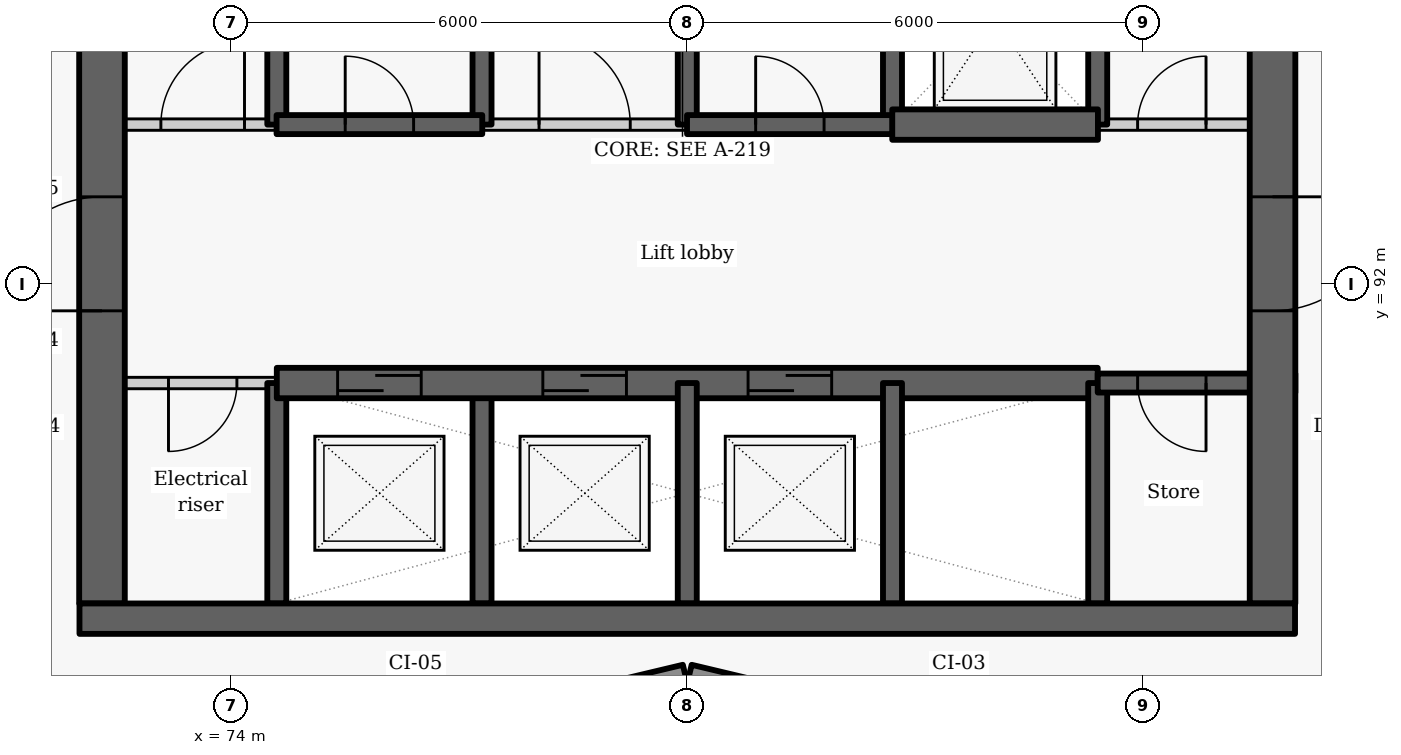
"""IFC4 building model, lengths in metres.
Left out: names, types, materials, properties, quantities, classifications, styles, units other than length and angle.
Written with IfcOpenShell. Run it as: python <this file> out.ifc"""

import sys

from ifc_helpers import new_model, si_unit, direction, frame, frame_2d, origin, place, context, subcontext, project, spatial, rectangle, extrude, element, fill, save


model = new_model("IFC4")
c1 = context("Model", 3, precision=1e-05, world=origin(), true_north=direction((0.0, 1.0)))
c2 = subcontext(c1, "Body", "Model", "MODEL_VIEW")
j1 = project(units=[si_unit("LENGTHUNIT", "METRE"), si_unit("PLANEANGLEUNIT", "RADIAN")], contexts=[c1])
p1 = place(None, origin())
s1 = spatial("IfcSite", under=j1, at=p1, CompositionType="ELEMENT")
p2 = place(p1, origin())
s2 = spatial("IfcBuilding", under=s1, at=p2, CompositionType="ELEMENT")
p3 = place(p2, frame((0.0, 0.0, 97.5)))
s3 = spatial("IfcBuildingStorey", under=s2, at=p3, CompositionType="ELEMENT", Elevation=97.5)
for number, where, z_axis, x_axis in (
    (1, (76.814, 86.119, 0.0), (0.0, 0.0, 1.0), (0.973, 0.232, 0.0)),
    (2, (80.029, 86.872, 0.0), (0.0, 0.0, 1.0), (0.973, -0.232, 0.0)),
):
    element("IfcWall", number, at=place(p3, frame(where, z_axis=z_axis, x_axis=x_axis)), inside=s3, PredefinedType="SOLIDWALL", context=c2, shape_type="SweptSolid", body=[
        extrude(rectangle(XDim=3.246, YDim=0.25, at=frame_2d((1.623, 0.0))), origin(), (0.0, 0.0, 1.0), 2.425),
    ])
p4 = place(p3, frame((74.6, 87.8, -0.275), z_axis=(0.0, 0.0, 1.0), x_axis=(0.0, 1.0, 0.0)))
e3 = element("IfcWall", 3, at=p4, inside=s3, PredefinedType="SHEAR", context=c2, shape_type="SweptSolid", body=[
    extrude(rectangle(XDim=2.9, YDim=0.25, at=frame_2d((1.45, 0.0))), origin(), (0.0, 0.0, 1.0), 3.3),
])
p5 = place(p3, frame((74.6, 94.1, -0.275), z_axis=(0.0, 0.0, 1.0), x_axis=(0.0, 1.0, 0.0)))
e4 = element("IfcWall", 4, at=p5, inside=s3, PredefinedType="SHEAR", context=c2, shape_type="SweptSolid", body=[
    extrude(rectangle(XDim=2.8, YDim=0.25, at=frame_2d((1.4, 0.0))), origin(), (0.0, 0.0, 1.0), 3.3),
])
p6 = place(p3, frame((74.6, 90.7, 0.0), z_axis=(0.0, 0.0, 1.0), x_axis=(-1.0, 0.0, 0.0)))
e5 = element("IfcWall", 5, at=p6, inside=s3, PredefinedType="PARTITIONING", context=c2, shape_type="SweptSolid", body=[
    extrude(rectangle(XDim=2.6, YDim=0.15, at=frame_2d((1.3, 0.0))), origin(), (0.0, 0.0, 1.0), 3.025),
])
p7 = place(p6, frame((0.525, 0.0, 0.0)))
e6 = element("IfcOpeningElement", 6, at=p7, cuts=e5, PredefinedType="OPENING", context=c2, shape_type="SweptSolid", body=[
    extrude(rectangle(XDim=0.9, YDim=2.1, at=frame_2d((0.45, 1.05))), frame((0.0, 0.085, 0.0), z_axis=(0.0, -1.0, 0.0), x_axis=(1.0, 0.0, 0.0)), (0.0, 0.0, 1.0), 0.17),
])
p8 = place(p3, frame((72.3, 87.8, -0.275), z_axis=(0.0, 0.0, 1.0), x_axis=(0.0, 1.0, 0.0)))
e7 = element("IfcWall", 7, at=p8, inside=s3, PredefinedType="SHEAR", context=c2, shape_type="SweptSolid", body=[
    extrude(rectangle(XDim=9.1, YDim=0.6, at=frame_2d((4.55, 0.0))), origin(), (0.0, 0.0, 1.0), 3.3),
])
p9 = place(p8, frame((3.85, 0.0, 0.275)))
e8 = element("IfcOpeningElement", 8, at=p9, cuts=e7, PredefinedType="OPENING", context=c2, shape_type="SweptSolid", body=[
    extrude(rectangle(XDim=1.5, YDim=2.1, at=frame_2d((0.75, 1.05))), frame((0.0, 0.31, 0.0), z_axis=(0.0, -1.0, 0.0), x_axis=(1.0, 0.0, 0.0)), (0.0, 0.0, 1.0), 0.62),
])
p10 = place(p3, frame((77.3, 87.8, -0.275), z_axis=(0.0, 0.0, 1.0), x_axis=(0.0, 1.0, 0.0)))
e9 = element("IfcWall", 9, at=p10, inside=s3, PredefinedType="SHEAR", context=c2, shape_type="SweptSolid", body=[
    extrude(rectangle(XDim=2.9, YDim=0.25, at=frame_2d((1.45, 0.0))), origin(), (0.0, 0.0, 1.0), 3.3),
])
p11 = place(p3, frame((77.3, 94.1, -0.275), z_axis=(0.0, 0.0, 1.0), x_axis=(0.0, 1.0, 0.0)))
e10 = element("IfcWall", 10, at=p11, inside=s3, PredefinedType="SHEAR", context=c2, shape_type="SweptSolid", body=[
    extrude(rectangle(XDim=2.8, YDim=0.25, at=frame_2d((1.4, 0.0))), origin(), (0.0, 0.0, 1.0), 3.3),
])
p12 = place(p3, frame((74.6, 90.7, -0.275), z_axis=(0.0, 0.0, 1.0), x_axis=(1.0, 0.0, 0.0)))
e11 = element("IfcWall", 11, at=p12, inside=s3, PredefinedType="SHEAR", context=c2, shape_type="SweptSolid", body=[
    extrude(rectangle(XDim=10.8, YDim=0.4, at=frame_2d((5.4, 0.0))), origin(), (0.0, 0.0, 1.0), 3.3),
])
p13 = place(p12, frame((0.8, 0.0, 0.275)))
e12 = element("IfcOpeningElement", 12, at=p13, cuts=e11, PredefinedType="OPENING", context=c2, shape_type="SweptSolid", body=[
    extrude(rectangle(XDim=1.1, YDim=2.1, at=frame_2d((0.55, 1.05))), frame((0.0, 0.21, 0.0), z_axis=(0.0, -1.0, 0.0), x_axis=(1.0, 0.0, 0.0)), (0.0, 0.0, 1.0), 0.42),
])
p14 = place(p12, frame((3.5, 0.0, 0.275)))
e13 = element("IfcOpeningElement", 13, at=p14, cuts=e11, PredefinedType="OPENING", context=c2, shape_type="SweptSolid", body=[
    extrude(rectangle(XDim=1.1, YDim=2.1, at=frame_2d((0.55, 1.05))), frame((0.0, 0.21, 0.0), z_axis=(0.0, -1.0, 0.0), x_axis=(1.0, 0.0, 0.0)), (0.0, 0.0, 1.0), 0.42),
])
p15 = place(p12, frame((6.2, 0.0, 0.275)))
e14 = element("IfcOpeningElement", 14, at=p15, cuts=e11, PredefinedType="OPENING", context=c2, shape_type="SweptSolid", body=[
    extrude(rectangle(XDim=1.1, YDim=2.1, at=frame_2d((0.55, 1.05))), frame((0.0, 0.21, 0.0), z_axis=(0.0, -1.0, 0.0), x_axis=(1.0, 0.0, 0.0)), (0.0, 0.0, 1.0), 0.42),
])
p16 = place(p3, frame((80.0, 87.8, -0.275), z_axis=(0.0, 0.0, 1.0), x_axis=(0.0, 1.0, 0.0)))
e15 = element("IfcWall", 15, at=p16, inside=s3, PredefinedType="SHEAR", context=c2, shape_type="SweptSolid", body=[
    extrude(rectangle(XDim=2.9, YDim=0.25, at=frame_2d((1.45, 0.0))), origin(), (0.0, 0.0, 1.0), 3.3),
])
p17 = place(p3, frame((80.0, 94.1, -0.275), z_axis=(0.0, 0.0, 1.0), x_axis=(0.0, 1.0, 0.0)))
e16 = element("IfcWall", 16, at=p17, inside=s3, PredefinedType="SHEAR", context=c2, shape_type="SweptSolid", body=[
    extrude(rectangle(XDim=2.8, YDim=0.25, at=frame_2d((1.4, 0.0))), origin(), (0.0, 0.0, 1.0), 3.3),
])
p18 = place(p3, frame((82.7, 87.8, -0.275), z_axis=(0.0, 0.0, 1.0), x_axis=(0.0, 1.0, 0.0)))
e17 = element("IfcWall", 17, at=p18, inside=s3, PredefinedType="SHEAR", context=c2, shape_type="SweptSolid", body=[
    extrude(rectangle(XDim=2.9, YDim=0.25, at=frame_2d((1.45, 0.0))), origin(), (0.0, 0.0, 1.0), 3.3),
])
p19 = place(p3, frame((82.7, 94.1, -0.275), z_axis=(0.0, 0.0, 1.0), x_axis=(0.0, 1.0, 0.0)))
e18 = element("IfcWall", 18, at=p19, inside=s3, PredefinedType="SHEAR", context=c2, shape_type="SweptSolid", body=[
    extrude(rectangle(XDim=2.8, YDim=0.25, at=frame_2d((1.4, 0.0))), origin(), (0.0, 0.0, 1.0), 3.3),
])
p20 = place(p3, frame((85.4, 87.8, -0.275), z_axis=(0.0, 0.0, 1.0), x_axis=(0.0, 1.0, 0.0)))
e19 = element("IfcWall", 19, at=p20, inside=s3, PredefinedType="SHEAR", context=c2, shape_type="SweptSolid", body=[
    extrude(rectangle(XDim=2.9, YDim=0.25, at=frame_2d((1.45, 0.0))), origin(), (0.0, 0.0, 1.0), 3.3),
])
p21 = place(p3, frame((85.4, 94.1, -0.275), z_axis=(0.0, 0.0, 1.0), x_axis=(0.0, 1.0, 0.0)))
e20 = element("IfcWall", 20, at=p21, inside=s3, PredefinedType="SHEAR", context=c2, shape_type="SweptSolid", body=[
    extrude(rectangle(XDim=2.8, YDim=0.25, at=frame_2d((1.4, 0.0))), origin(), (0.0, 0.0, 1.0), 3.3),
])
p22 = place(p3, frame((88.0, 90.7, -0.275), z_axis=(0.0, 0.0, 1.0), x_axis=(-1.0, 0.0, 0.0)))
e21 = element("IfcWall", 21, at=p22, inside=s3, PredefinedType="SHEAR", context=c2, shape_type="SweptSolid", body=[
    extrude(rectangle(XDim=2.6, YDim=0.25, at=frame_2d((1.3, 0.0))), origin(), (0.0, 0.0, 1.0), 3.3),
])
p23 = place(p22, frame((1.175, 0.0, 0.275)))
e22 = element("IfcOpeningElement", 22, at=p23, cuts=e21, PredefinedType="OPENING", context=c2, shape_type="SweptSolid", body=[
    extrude(rectangle(XDim=0.9, YDim=2.1, at=frame_2d((0.45, 1.05))), frame((0.0, 0.135, 0.0), z_axis=(0.0, -1.0, 0.0), x_axis=(1.0, 0.0, 0.0)), (0.0, 0.0, 1.0), 0.27),
])
p24 = place(p3, frame((87.7, 103.4, -0.275), z_axis=(0.0, 0.0, 1.0), x_axis=(0.0, -1.0, 0.0)))
e23 = element("IfcWall", 23, at=p24, inside=s3, PredefinedType="SHEAR", context=c2, shape_type="SweptSolid", body=[
    extrude(rectangle(XDim=15.6, YDim=0.6, at=frame_2d((7.8, 0.0))), origin(), (0.0, 0.0, 1.0), 3.3),
])
p25 = place(p24, frame((10.25, 0.0, 0.275)))
e24 = element("IfcOpeningElement", 24, at=p25, cuts=e23, PredefinedType="OPENING", context=c2, shape_type="SweptSolid", body=[
    extrude(rectangle(XDim=1.5, YDim=2.1, at=frame_2d((0.75, 1.05))), frame((0.0, 0.31, 0.0), z_axis=(0.0, -1.0, 0.0), x_axis=(1.0, 0.0, 0.0)), (0.0, 0.0, 1.0), 0.62),
])
p26 = place(p24, frame((2.7, 0.0, 0.275)))
e25 = element("IfcOpeningElement", 25, at=p26, cuts=e23, PredefinedType="OPENING", context=c2, shape_type="SweptSolid", body=[
    extrude(rectangle(XDim=1.1, YDim=2.1, at=frame_2d((0.55, 1.05))), frame((0.0, 0.31, 0.0), z_axis=(0.0, -1.0, 0.0), x_axis=(1.0, 0.0, 0.0)), (0.0, 0.0, 1.0), 0.62),
])
p27 = place(p3, frame((72.0, 94.1, 0.0), z_axis=(0.0, 0.0, 1.0), x_axis=(1.0, 0.0, 0.0)))
e26 = element("IfcWall", 26, at=p27, inside=s3, PredefinedType="PARTITIONING", context=c2, shape_type="SweptSolid", body=[
    extrude(rectangle(XDim=2.603, YDim=0.15, at=frame_2d((1.302, 0.0))), origin(), (0.0, 0.0, 1.0), 3.025),
])
p28 = place(p27, frame((1.075, 0.0, 0.0)))
e27 = element("IfcOpeningElement", 27, at=p28, cuts=e26, PredefinedType="OPENING", context=c2, shape_type="SweptSolid", body=[
    extrude(rectangle(XDim=1.1, YDim=2.1, at=frame_2d((0.55, 1.05))), frame((0.0, 0.085, 0.0), z_axis=(0.0, -1.0, 0.0), x_axis=(1.0, 0.0, 0.0)), (0.0, 0.0, 1.0), 0.17),
])
p29 = place(p3, frame((77.297, 94.1, 0.0), z_axis=(0.0, 0.0, 1.0), x_axis=(1.0, 0.0, 0.0)))
e28 = element("IfcWall", 28, at=p29, inside=s3, PredefinedType="PARTITIONING", context=c2, shape_type="SweptSolid", body=[
    extrude(rectangle(XDim=2.706, YDim=0.15, at=frame_2d((1.353, 0.0))), origin(), (0.0, 0.0, 1.0), 3.025),
])
p30 = place(p29, frame((0.753, 0.0, 0.0)))
e29 = element("IfcOpeningElement", 29, at=p30, cuts=e28, PredefinedType="OPENING", context=c2, shape_type="SweptSolid", body=[
    extrude(rectangle(XDim=1.2, YDim=2.1, at=frame_2d((0.6, 1.05))), frame((0.0, 0.085, 0.0), z_axis=(0.0, -1.0, 0.0), x_axis=(1.0, 0.0, 0.0)), (0.0, 0.0, 1.0), 0.17),
])
p31 = place(p3, frame((85.397, 94.1, 0.0), z_axis=(0.0, 0.0, 1.0), x_axis=(1.0, 0.0, 0.0)))
e30 = element("IfcWall", 30, at=p31, inside=s3, PredefinedType="PARTITIONING", context=c2, shape_type="SweptSolid", body=[
    extrude(rectangle(XDim=2.603, YDim=0.15, at=frame_2d((1.302, 0.0))), origin(), (0.0, 0.0, 1.0), 3.025),
])
p32 = place(p31, frame((0.528, 0.0, 0.0)))
e31 = element("IfcOpeningElement", 31, at=p32, cuts=e30, PredefinedType="OPENING", context=c2, shape_type="SweptSolid", body=[
    extrude(rectangle(XDim=0.9, YDim=2.1, at=frame_2d((0.45, 1.05))), frame((0.0, 0.085, 0.0), z_axis=(0.0, -1.0, 0.0), x_axis=(1.0, 0.0, 0.0)), (0.0, 0.0, 1.0), 0.17),
])
p33 = place(p3, frame((74.597, 94.1, -0.275), z_axis=(0.0, 0.0, 1.0), x_axis=(1.0, 0.0, 0.0)))
e32 = element("IfcWall", 32, at=p33, inside=s3, PredefinedType="SHEAR", context=c2, shape_type="SweptSolid", body=[
    extrude(rectangle(XDim=2.706, YDim=0.25, at=frame_2d((1.353, 0.0))), origin(), (0.0, 0.0, 1.0), 3.3),
])
p34 = place(p33, frame((0.903, 0.0, 0.275)))
e33 = element("IfcOpeningElement", 33, at=p34, cuts=e32, PredefinedType="OPENING", context=c2, shape_type="SweptSolid", body=[
    extrude(rectangle(XDim=0.9, YDim=2.1, at=frame_2d((0.45, 1.05))), frame((0.0, 0.135, 0.0), z_axis=(0.0, -1.0, 0.0), x_axis=(1.0, 0.0, 0.0)), (0.0, 0.0, 1.0), 0.27),
])
p35 = place(p3, frame((79.997, 94.1, -0.275), z_axis=(0.0, 0.0, 1.0), x_axis=(1.0, 0.0, 0.0)))
e34 = element("IfcWall", 34, at=p35, inside=s3, PredefinedType="SHEAR", context=c2, shape_type="SweptSolid", body=[
    extrude(rectangle(XDim=2.706, YDim=0.25, at=frame_2d((1.353, 0.0))), origin(), (0.0, 0.0, 1.0), 3.3),
])
p36 = place(p35, frame((0.903, 0.0, 0.275)))
e35 = element("IfcOpeningElement", 35, at=p36, cuts=e34, PredefinedType="OPENING", context=c2, shape_type="SweptSolid", body=[
    extrude(rectangle(XDim=0.9, YDim=2.1, at=frame_2d((0.45, 1.05))), frame((0.0, 0.135, 0.0), z_axis=(0.0, -1.0, 0.0), x_axis=(1.0, 0.0, 0.0)), (0.0, 0.0, 1.0), 0.27),
])
p37 = place(p3, frame((82.697, 94.1, -0.275), z_axis=(0.0, 0.0, 1.0), x_axis=(1.0, 0.0, 0.0)))
e36 = element("IfcWall", 36, at=p37, inside=s3, PredefinedType="SHEAR", context=c2, shape_type="SweptSolid", body=[
    extrude(rectangle(XDim=2.706, YDim=0.4, at=frame_2d((1.353, 0.0))), origin(), (0.0, 0.0, 1.0), 3.3),
])
p38 = place(p3, frame((72.004, 87.6, -0.275), z_axis=(0.0, 0.0, 1.0), x_axis=(1.0, 0.0, 0.0)))
e37 = element("IfcWall", 37, at=p38, inside=s3, PredefinedType="SHEAR", context=c2, shape_type="SweptSolid", body=[
    extrude(rectangle(XDim=15.992, YDim=0.4, at=frame_2d((7.996, 0.0))), origin(), (0.0, 0.0, 1.0), 3.3),
])
p39 = place(p7, origin())
e38 = element("IfcDoor", 38, at=p39, inside=s3, OperationType="SINGLE_SWING_RIGHT", PredefinedType="DOOR", context=c2, shape_type="SweptSolid", body=[
    extrude(rectangle(XDim=0.9, YDim=2.1, at=frame_2d((0.45, 1.05))), frame((0.0, 0.025, 0.0), z_axis=(0.0, -1.0, 0.0), x_axis=(1.0, 0.0, 0.0)), (0.0, 0.0, 1.0), 0.05),
])
fill(e6, e38)
p40 = place(p13, origin())
e39 = element("IfcDoor", 39, at=p40, inside=s3, OperationType="SLIDING_TO_LEFT", PredefinedType="DOOR", context=c2, shape_type="SweptSolid", body=[
    extrude(rectangle(XDim=1.1, YDim=2.1, at=frame_2d((0.55, 1.05))), frame((0.0, 0.025, 0.0), z_axis=(0.0, -1.0, 0.0), x_axis=(1.0, 0.0, 0.0)), (0.0, 0.0, 1.0), 0.05),
])
fill(e12, e39)
p41 = place(p14, origin())
e40 = element("IfcDoor", 40, at=p41, inside=s3, OperationType="SLIDING_TO_LEFT", PredefinedType="DOOR", context=c2, shape_type="SweptSolid", body=[
    extrude(rectangle(XDim=1.1, YDim=2.1, at=frame_2d((0.55, 1.05))), frame((0.0, 0.025, 0.0), z_axis=(0.0, -1.0, 0.0), x_axis=(1.0, 0.0, 0.0)), (0.0, 0.0, 1.0), 0.05),
])
fill(e13, e40)
p42 = place(p15, origin())
e41 = element("IfcDoor", 41, at=p42, inside=s3, OperationType="SLIDING_TO_LEFT", PredefinedType="DOOR", context=c2, shape_type="SweptSolid", body=[
    extrude(rectangle(XDim=1.1, YDim=2.1, at=frame_2d((0.55, 1.05))), frame((0.0, 0.025, 0.0), z_axis=(0.0, -1.0, 0.0), x_axis=(1.0, 0.0, 0.0)), (0.0, 0.0, 1.0), 0.05),
])
fill(e14, e41)
p43 = place(p23, origin())
e42 = element("IfcDoor", 42, at=p43, inside=s3, OperationType="SINGLE_SWING_LEFT", PredefinedType="DOOR", context=c2, shape_type="SweptSolid", body=[
    extrude(rectangle(XDim=0.9, YDim=2.1, at=frame_2d((0.45, 1.05))), frame((0.0, 0.025, 0.0), z_axis=(0.0, -1.0, 0.0), x_axis=(1.0, 0.0, 0.0)), (0.0, 0.0, 1.0), 0.05),
])
fill(e22, e42)
p44 = place(p28, origin())
e43 = element("IfcDoor", 43, at=p44, inside=s3, OperationType="SINGLE_SWING_RIGHT", PredefinedType="DOOR", context=c2, shape_type="SweptSolid", body=[
    extrude(rectangle(XDim=1.1, YDim=2.1, at=frame_2d((0.55, 1.05))), frame((0.0, 0.025, 0.0), z_axis=(0.0, -1.0, 0.0), x_axis=(1.0, 0.0, 0.0)), (0.0, 0.0, 1.0), 0.05),
])
fill(e27, e43)
p45 = place(p34, origin())
e44 = element("IfcDoor", 44, at=p45, inside=s3, OperationType="SINGLE_SWING_LEFT", PredefinedType="DOOR", context=c2, shape_type="SweptSolid", body=[
    extrude(rectangle(XDim=0.9, YDim=2.1, at=frame_2d((0.45, 1.05))), frame((0.0, 0.025, 0.0), z_axis=(0.0, -1.0, 0.0), x_axis=(1.0, 0.0, 0.0)), (0.0, 0.0, 1.0), 0.05),
])
fill(e33, e44)
p46 = place(p30, origin())
e45 = element("IfcDoor", 45, at=p46, inside=s3, OperationType="DOUBLE_DOOR_SINGLE_SWING", PredefinedType="DOOR", context=c2, shape_type="SweptSolid", body=[
    extrude(rectangle(XDim=1.2, YDim=2.1, at=frame_2d((0.6, 1.05))), frame((0.0, 0.025, 0.0), z_axis=(0.0, -1.0, 0.0), x_axis=(1.0, 0.0, 0.0)), (0.0, 0.0, 1.0), 0.05),
])
fill(e29, e45)
p47 = place(p36, origin())
e46 = element("IfcDoor", 46, at=p47, inside=s3, OperationType="SINGLE_SWING_LEFT", PredefinedType="DOOR", context=c2, shape_type="SweptSolid", body=[
    extrude(rectangle(XDim=0.9, YDim=2.1, at=frame_2d((0.45, 1.05))), frame((0.0, 0.025, 0.0), z_axis=(0.0, -1.0, 0.0), x_axis=(1.0, 0.0, 0.0)), (0.0, 0.0, 1.0), 0.05),
])
fill(e35, e46)
p48 = place(p32, origin())
e47 = element("IfcDoor", 47, at=p48, inside=s3, OperationType="SINGLE_SWING_RIGHT", PredefinedType="DOOR", context=c2, shape_type="SweptSolid", body=[
    extrude(rectangle(XDim=0.9, YDim=2.1, at=frame_2d((0.45, 1.05))), frame((0.0, 0.025, 0.0), z_axis=(0.0, -1.0, 0.0), x_axis=(1.0, 0.0, 0.0)), (0.0, 0.0, 1.0), 0.05),
])
fill(e31, e47)
p49 = place(p25, origin())
e48 = element("IfcDoor", 48, at=p49, inside=s3, OperationType="DOUBLE_DOOR_SINGLE_SWING", PredefinedType="DOOR", context=c2, shape_type="SweptSolid", body=[
    extrude(rectangle(XDim=1.5, YDim=2.1, at=frame_2d((0.75, 1.05))), frame((0.0, 0.025, 0.0), z_axis=(0.0, -1.0, 0.0), x_axis=(1.0, 0.0, 0.0)), (0.0, 0.0, 1.0), 0.05),
])
fill(e24, e48)
p50 = place(p9, origin())
e49 = element("IfcDoor", 49, at=p50, inside=s3, OperationType="DOUBLE_DOOR_SINGLE_SWING", PredefinedType="DOOR", context=c2, shape_type="SweptSolid", body=[
    extrude(rectangle(XDim=1.5, YDim=2.1, at=frame_2d((0.75, 1.05))), frame((0.0, 0.025, 0.0), z_axis=(0.0, -1.0, 0.0), x_axis=(1.0, 0.0, 0.0)), (0.0, 0.0, 1.0), 0.05),
])
fill(e8, e49)
save(model, sys.argv[1])
